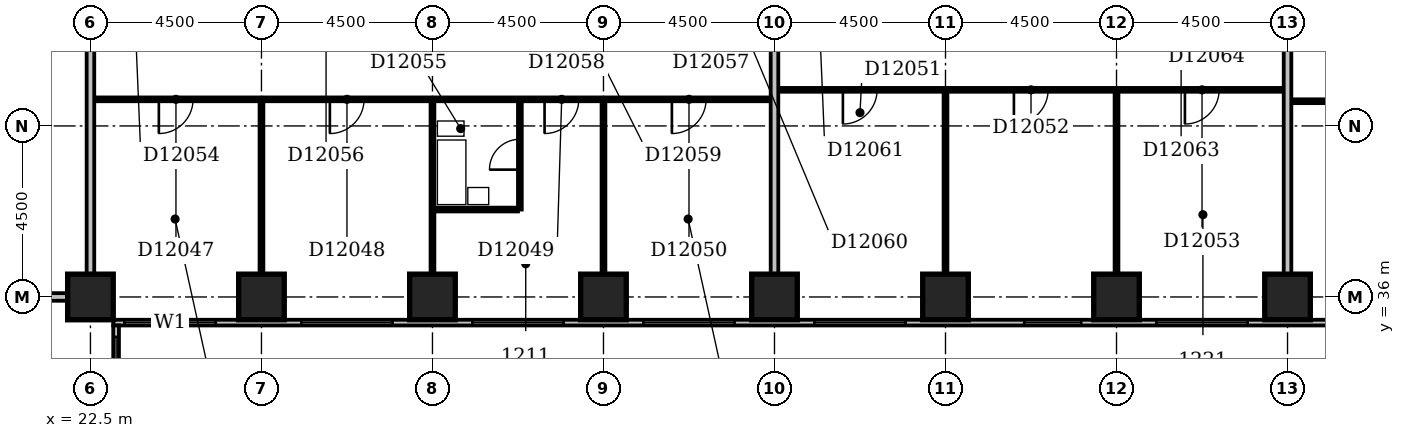
"""IFC4 building model, lengths in metres.
Left out: names, types, materials, properties, quantities, classifications, styles, units other than length and angle.
Written with IfcOpenShell. Run it as: python <this file> out.ifc"""

import sys

from ifc_helpers import new_model, si_unit, direction, frame, frame_2d, origin, origin_2d, place, context, subcontext, project, spatial, rectangle, extrude, element, fill, save


model = new_model("IFC4")
c1 = context("Model", 3, precision=1e-05, world=origin(), true_north=direction((0.0, 1.0)))
c2 = subcontext(c1, "Body", "Model", "MODEL_VIEW")
j1 = project(units=[si_unit("LENGTHUNIT", "METRE"), si_unit("PLANEANGLEUNIT", "RADIAN")], contexts=[c1])
p1 = place(None, origin())
s1 = spatial("IfcSite", under=j1, at=p1, CompositionType="ELEMENT")
p2 = place(p1, origin())
s2 = spatial("IfcBuilding", under=s1, at=p2, CompositionType="ELEMENT")
p3 = place(p2, frame((0.0, 0.0, 54.2)))
s3 = spatial("IfcBuildingStorey", under=s2, at=p3, CompositionType="ELEMENT", Elevation=54.2)
for number, where, z_axis, x_axis in (
    (1, (22.5, 36.0, -0.3), (0.0, 0.0, 1.0), (1.0, 0.0, 0.0)),
    (2, (27.0, 36.0, -0.3), (0.0, 0.0, 1.0), (1.0, 0.0, 0.0)),
    (3, (31.5, 36.0, -0.3), (0.0, 0.0, 1.0), (1.0, 0.0, 0.0)),
    (4, (36.0, 36.0, -0.3), (0.0, 0.0, 1.0), (1.0, 0.0, 0.0)),
    (5, (40.5, 36.0, -0.3), (0.0, 0.0, 1.0), (1.0, 0.0, 0.0)),
    (6, (45.0, 36.0, -0.3), (0.0, 0.0, 1.0), (1.0, 0.0, 0.0)),
    (7, (49.5, 36.0, -0.3), (0.0, 0.0, 1.0), (1.0, 0.0, 0.0)),
    (8, (54.0, 36.0, -0.3), (0.0, 0.0, 1.0), (1.0, 0.0, 0.0)),
):
    element("IfcColumn", number, at=place(p3, frame(where, z_axis=z_axis, x_axis=x_axis)), inside=s3, PredefinedType="COLUMN", context=c2, shape_type="SweptSolid", body=[
        extrude(rectangle(XDim=1.2, YDim=1.2, at=origin_2d()), origin(), (0.0, 0.0, 1.0), 3.6),
    ])
p4 = place(p3, frame((23.175, 17.4, 0.0), z_axis=(0.0, 0.0, 1.0), x_axis=(0.0, 1.0, 0.0)))
e9 = element("IfcWall", 9, at=p4, inside=s3, PredefinedType="STANDARD", context=c2, shape_type="SweptSolid", body=[
    extrude(rectangle(XDim=17.85, YDim=0.15, at=frame_2d((8.925, 0.0))), origin(), (0.0, 0.0, 1.0), 2.7),
])
p5 = place(p4, frame((1.444, 0.0, 0.6)))
e10 = element("IfcOpeningElement", 10, at=p5, cuts=e9, PredefinedType="OPENING", context=c2, shape_type="SweptSolid", body=[
    extrude(rectangle(XDim=2.4, YDim=1.8, at=frame_2d((1.2, 0.9))), frame((0.0, 0.087, 0.0), z_axis=(0.0, -1.0, 0.0), x_axis=(1.0, 0.0, 0.0)), (0.0, 0.0, 1.0), 0.174),
])
p6 = place(p4, frame((6.287, 0.0, 0.6)))
e11 = element("IfcOpeningElement", 11, at=p6, cuts=e9, PredefinedType="OPENING", context=c2, shape_type="SweptSolid", body=[
    extrude(rectangle(XDim=2.4, YDim=1.8, at=frame_2d((1.2, 0.9))), frame((0.0, 0.087, 0.0), z_axis=(0.0, -1.0, 0.0), x_axis=(1.0, 0.0, 0.0)), (0.0, 0.0, 1.0), 0.174),
])
p7 = place(p4, frame((10.65, 0.0, 0.6)))
e12 = element("IfcOpeningElement", 12, at=p7, cuts=e9, PredefinedType="OPENING", context=c2, shape_type="SweptSolid", body=[
    extrude(rectangle(XDim=2.4, YDim=1.8, at=frame_2d((1.2, 0.9))), frame((0.0, 0.087, 0.0), z_axis=(0.0, -1.0, 0.0), x_axis=(1.0, 0.0, 0.0)), (0.0, 0.0, 1.0), 0.174),
])
p8 = place(p4, frame((15.15, 0.0, 0.6)))
e13 = element("IfcOpeningElement", 13, at=p8, cuts=e9, PredefinedType="OPENING", context=c2, shape_type="SweptSolid", body=[
    extrude(rectangle(XDim=2.4, YDim=1.8, at=frame_2d((1.2, 0.9))), frame((0.0, 0.087, 0.0), z_axis=(0.0, -1.0, 0.0), x_axis=(1.0, 0.0, 0.0)), (0.0, 0.0, 1.0), 0.174),
])
p9 = place(p3, frame((23.1, 35.325, 0.0), z_axis=(0.0, 0.0, 1.0), x_axis=(1.0, 0.0, 0.0)))
e14 = element("IfcWall", 14, at=p9, inside=s3, PredefinedType="STANDARD", context=c2, shape_type="SweptSolid", body=[
    extrude(rectangle(XDim=45.15, YDim=0.15, at=frame_2d((22.575, 0.0))), origin(), (0.0, 0.0, 1.0), 2.7),
])
p10 = place(p9, frame((0.297, 0.0, 0.6)))
e15 = element("IfcOpeningElement", 15, at=p10, cuts=e14, PredefinedType="OPENING", context=c2, shape_type="SweptSolid", body=[
    extrude(rectangle(XDim=2.4, YDim=1.8, at=frame_2d((1.2, 0.9))), frame((0.0, 0.087, 0.0), z_axis=(0.0, -1.0, 0.0), x_axis=(1.0, 0.0, 0.0)), (0.0, 0.0, 1.0), 0.174),
])
p11 = place(p9, frame((4.95, 0.0, 0.6)))
e16 = element("IfcOpeningElement", 16, at=p11, cuts=e14, PredefinedType="OPENING", context=c2, shape_type="SweptSolid", body=[
    extrude(rectangle(XDim=2.4, YDim=1.8, at=frame_2d((1.2, 0.9))), frame((0.0, 0.087, 0.0), z_axis=(0.0, -1.0, 0.0), x_axis=(1.0, 0.0, 0.0)), (0.0, 0.0, 1.0), 0.174),
])
p12 = place(p9, frame((9.45, 0.0, 0.6)))
e17 = element("IfcOpeningElement", 17, at=p12, cuts=e14, PredefinedType="OPENING", context=c2, shape_type="SweptSolid", body=[
    extrude(rectangle(XDim=2.4, YDim=1.8, at=frame_2d((1.2, 0.9))), frame((0.0, 0.087, 0.0), z_axis=(0.0, -1.0, 0.0), x_axis=(1.0, 0.0, 0.0)), (0.0, 0.0, 1.0), 0.174),
])
p13 = place(p9, frame((13.95, 0.0, 0.6)))
e18 = element("IfcOpeningElement", 18, at=p13, cuts=e14, PredefinedType="OPENING", context=c2, shape_type="SweptSolid", body=[
    extrude(rectangle(XDim=2.4, YDim=1.8, at=frame_2d((1.2, 0.9))), frame((0.0, 0.087, 0.0), z_axis=(0.0, -1.0, 0.0), x_axis=(1.0, 0.0, 0.0)), (0.0, 0.0, 1.0), 0.174),
])
p14 = place(p9, frame((18.45, 0.0, 0.6)))
e19 = element("IfcOpeningElement", 19, at=p14, cuts=e14, PredefinedType="OPENING", context=c2, shape_type="SweptSolid", body=[
    extrude(rectangle(XDim=2.4, YDim=1.8, at=frame_2d((1.2, 0.9))), frame((0.0, 0.087, 0.0), z_axis=(0.0, -1.0, 0.0), x_axis=(1.0, 0.0, 0.0)), (0.0, 0.0, 1.0), 0.174),
])
p15 = place(p9, frame((23.97, 0.0, 0.6)))
e20 = element("IfcOpeningElement", 20, at=p15, cuts=e14, PredefinedType="OPENING", context=c2, shape_type="SweptSolid", body=[
    extrude(rectangle(XDim=1.5, YDim=1.8, at=frame_2d((0.75, 0.9))), frame((0.0, 0.087, 0.0), z_axis=(0.0, -1.0, 0.0), x_axis=(1.0, 0.0, 0.0)), (0.0, 0.0, 1.0), 0.174),
])
p16 = place(p9, frame((27.45, 0.0, 0.6)))
e21 = element("IfcOpeningElement", 21, at=p16, cuts=e14, PredefinedType="OPENING", context=c2, shape_type="SweptSolid", body=[
    extrude(rectangle(XDim=2.4, YDim=1.8, at=frame_2d((1.2, 0.9))), frame((0.0, 0.087, 0.0), z_axis=(0.0, -1.0, 0.0), x_axis=(1.0, 0.0, 0.0)), (0.0, 0.0, 1.0), 0.174),
])
p17 = place(p9, frame((32.403, 0.0, 0.6)))
e22 = element("IfcOpeningElement", 22, at=p17, cuts=e14, PredefinedType="OPENING", context=c2, shape_type="SweptSolid", body=[
    extrude(rectangle(XDim=2.1, YDim=1.8, at=frame_2d((1.05, 0.9))), frame((0.0, 0.087, 0.0), z_axis=(0.0, -1.0, 0.0), x_axis=(1.0, 0.0, 0.0)), (0.0, 0.0, 1.0), 0.174),
])
p18 = place(p9, frame((36.45, 0.0, 0.6)))
e23 = element("IfcOpeningElement", 23, at=p18, cuts=e14, PredefinedType="OPENING", context=c2, shape_type="SweptSolid", body=[
    extrude(rectangle(XDim=2.4, YDim=1.8, at=frame_2d((1.2, 0.9))), frame((0.0, 0.087, 0.0), z_axis=(0.0, -1.0, 0.0), x_axis=(1.0, 0.0, 0.0)), (0.0, 0.0, 1.0), 0.174),
])
p19 = place(p9, frame((40.95, 0.0, 0.6)))
e24 = element("IfcOpeningElement", 24, at=p19, cuts=e14, PredefinedType="OPENING", context=c2, shape_type="SweptSolid", body=[
    extrude(rectangle(XDim=2.4, YDim=1.8, at=frame_2d((1.2, 0.9))), frame((0.0, 0.087, 0.0), z_axis=(0.0, -1.0, 0.0), x_axis=(1.0, 0.0, 0.0)), (0.0, 0.0, 1.0), 0.174),
])
p20 = place(p3, frame((9.1, 36.0, 0.0), z_axis=(0.0, 0.0, 1.0), x_axis=(1.0, 0.0, 0.0)))
e25 = element("IfcWall", 25, at=p20, inside=s3, PredefinedType="PARTITIONING", context=c2, shape_type="SweptSolid", body=[
    extrude(rectangle(XDim=12.8, YDim=0.2, at=frame_2d((6.4, 0.0))), origin(), (0.0, 0.0, 1.0), 2.4),
])
p21 = place(p3, frame((22.5, 36.6, 0.0), z_axis=(0.0, 0.0, 1.0), x_axis=(0.0, 1.0, 0.0)))
e26 = element("IfcWall", 26, at=p21, inside=s3, PredefinedType="PARTITIONING", context=c2, shape_type="SweptSolid", body=[
    extrude(rectangle(XDim=12.8, YDim=0.2, at=frame_2d((6.4, 0.0))), origin(), (0.0, 0.0, 1.0), 3.3),
])
p22 = place(p3, frame((27.0, 36.6, 0.0), z_axis=(0.0, 0.0, 1.0), x_axis=(0.0, 1.0, 0.0)))
e27 = element("IfcWall", 27, at=p22, inside=s3, PredefinedType="PARTITIONING", context=c2, shape_type="SweptSolid", body=[
    extrude(rectangle(XDim=4.55, YDim=0.1, at=frame_2d((2.275, 0.0))), origin(), (0.0, 0.0, 1.0), 2.6),
])
p23 = place(p3, frame((31.5, 36.6, 0.0), z_axis=(0.0, 0.0, 1.0), x_axis=(0.0, 1.0, 0.0)))
e28 = element("IfcWall", 28, at=p23, inside=s3, PredefinedType="PARTITIONING", context=c2, shape_type="SweptSolid", body=[
    extrude(rectangle(XDim=4.55, YDim=0.1, at=frame_2d((2.275, 0.0))), origin(), (0.0, 0.0, 1.0), 3.3),
])
p24 = place(p3, frame((36.0, 36.6, 0.0), z_axis=(0.0, 0.0, 1.0), x_axis=(0.0, 1.0, 0.0)))
e29 = element("IfcWall", 29, at=p24, inside=s3, PredefinedType="PARTITIONING", context=c2, shape_type="SweptSolid", body=[
    extrude(rectangle(XDim=4.55, YDim=0.1, at=frame_2d((2.275, 0.0))), origin(), (0.0, 0.0, 1.0), 2.4),
])
p25 = place(p3, frame((40.5, 36.6, 0.0), z_axis=(0.0, 0.0, 1.0), x_axis=(0.0, 1.0, 0.0)))
e30 = element("IfcWall", 30, at=p25, inside=s3, PredefinedType="PARTITIONING", context=c2, shape_type="SweptSolid", body=[
    extrude(rectangle(XDim=12.8, YDim=0.2, at=frame_2d((6.4, 0.0))), origin(), (0.0, 0.0, 1.0), 3.3),
])
p26 = place(p3, frame((45.0, 36.6, 0.0), z_axis=(0.0, 0.0, 1.0), x_axis=(0.0, 1.0, 0.0)))
e31 = element("IfcWall", 31, at=p26, inside=s3, PredefinedType="PARTITIONING", context=c2, shape_type="SweptSolid", body=[
    extrude(rectangle(XDim=4.8, YDim=0.1, at=frame_2d((2.4, 0.0))), origin(), (0.0, 0.0, 1.0), 2.6),
])
p27 = place(p3, frame((49.5, 36.6, 0.0), z_axis=(0.0, 0.0, 1.0), x_axis=(0.0, 1.0, 0.0)))
e32 = element("IfcWall", 32, at=p27, inside=s3, PredefinedType="PARTITIONING", context=c2, shape_type="SweptSolid", body=[
    extrude(rectangle(XDim=4.8, YDim=0.1, at=frame_2d((2.4, 0.0))), origin(), (0.0, 0.0, 1.0), 3.3),
])
p28 = place(p3, frame((54.0, 36.6, 0.0), z_axis=(0.0, 0.0, 1.0), x_axis=(0.0, 1.0, 0.0)))
e33 = element("IfcWall", 33, at=p28, inside=s3, PredefinedType="PARTITIONING", context=c2, shape_type="SweptSolid", body=[
    extrude(rectangle(XDim=12.8, YDim=0.2, at=frame_2d((6.4, 0.0))), origin(), (0.0, 0.0, 1.0), 2.6),
])
p29 = place(p3, frame((31.55, 38.3, 0.0), z_axis=(0.0, 0.0, 1.0), x_axis=(1.0, 0.0, 0.0)))
e34 = element("IfcWall", 34, at=p29, inside=s3, PredefinedType="PLUMBINGWALL", context=c2, shape_type="SweptSolid", body=[
    extrude(rectangle(XDim=2.2, YDim=0.1, at=frame_2d((1.1, 0.0))), origin(), (0.0, 0.0, 1.0), 3.3),
])
p30 = place(p3, frame((33.8, 38.3, 0.0), z_axis=(0.0, 0.0, 1.0), x_axis=(0.0, 1.0, 0.0)))
e35 = element("IfcWall", 35, at=p30, inside=s3, PredefinedType="PLUMBINGWALL", context=c2, shape_type="SweptSolid", body=[
    extrude(rectangle(XDim=2.85, YDim=0.1, at=frame_2d((1.425, 0.0))), origin(), (0.0, 0.0, 1.0), 3.3),
])
p31 = place(p30, frame((1.05, 0.0, 0.0)))
e36 = element("IfcOpeningElement", 36, at=p31, cuts=e35, PredefinedType="OPENING", context=c2, shape_type="SweptSolid", body=[
    extrude(rectangle(XDim=0.8, YDim=2.1, at=frame_2d((0.4, 1.05))), frame((0.0, 0.062, 0.0), z_axis=(0.0, -1.0, 0.0), x_axis=(1.0, 0.0, 0.0)), (0.0, 0.0, 1.0), 0.124),
])
p32 = place(p3, frame((54.1, 41.15, 0.0), z_axis=(0.0, 0.0, 1.0), x_axis=(1.0, 0.0, 0.0)))
e37 = element("IfcWall", 37, at=p32, inside=s3, PredefinedType="PARTITIONING", context=c2, shape_type="SweptSolid", body=[
    extrude(rectangle(XDim=14.0, YDim=0.1, at=frame_2d((7.0, 0.0))), origin(), (0.0, 0.0, 1.0), 3.3),
])
p33 = place(p32, frame((1.7, 0.0, 0.0)))
e38 = element("IfcOpeningElement", 38, at=p33, cuts=e37, PredefinedType="OPENING", context=c2, shape_type="SweptSolid", body=[
    extrude(rectangle(XDim=0.9, YDim=2.1, at=frame_2d((0.45, 1.05))), frame((0.0, 0.062, 0.0), z_axis=(0.0, -1.0, 0.0), x_axis=(1.0, 0.0, 0.0)), (0.0, 0.0, 1.0), 0.124),
])
p34 = place(p32, frame((6.2, 0.0, 0.0)))
e39 = element("IfcOpeningElement", 39, at=p34, cuts=e37, PredefinedType="OPENING", context=c2, shape_type="SweptSolid", body=[
    extrude(rectangle(XDim=0.9, YDim=2.1, at=frame_2d((0.45, 1.05))), frame((0.0, 0.062, 0.0), z_axis=(0.0, -1.0, 0.0), x_axis=(1.0, 0.0, 0.0)), (0.0, 0.0, 1.0), 0.124),
])
p35 = place(p32, frame((10.7, 0.0, 0.0)))
e40 = element("IfcOpeningElement", 40, at=p35, cuts=e37, PredefinedType="OPENING", context=c2, shape_type="SweptSolid", body=[
    extrude(rectangle(XDim=0.9, YDim=2.1, at=frame_2d((0.45, 1.05))), frame((0.0, 0.062, 0.0), z_axis=(0.0, -1.0, 0.0), x_axis=(1.0, 0.0, 0.0)), (0.0, 0.0, 1.0), 0.124),
])
p36 = place(p3, frame((22.6, 41.2, 0.0), z_axis=(0.0, 0.0, 1.0), x_axis=(1.0, 0.0, 0.0)))
e41 = element("IfcWall", 41, at=p36, inside=s3, PredefinedType="PARTITIONING", context=c2, shape_type="SweptSolid", body=[
    extrude(rectangle(XDim=17.8, YDim=0.1, at=frame_2d((8.9, 0.0))), origin(), (0.0, 0.0, 1.0), 3.3),
])
p37 = place(p36, frame((1.7, 0.0, 0.0)))
e42 = element("IfcOpeningElement", 42, at=p37, cuts=e41, PredefinedType="OPENING", context=c2, shape_type="SweptSolid", body=[
    extrude(rectangle(XDim=0.9, YDim=2.1, at=frame_2d((0.45, 1.05))), frame((0.0, 0.062, 0.0), z_axis=(0.0, -1.0, 0.0), x_axis=(1.0, 0.0, 0.0)), (0.0, 0.0, 1.0), 0.124),
])
p38 = place(p36, frame((6.2, 0.0, 0.0)))
e43 = element("IfcOpeningElement", 43, at=p38, cuts=e41, PredefinedType="OPENING", context=c2, shape_type="SweptSolid", body=[
    extrude(rectangle(XDim=0.9, YDim=2.1, at=frame_2d((0.45, 1.05))), frame((0.0, 0.062, 0.0), z_axis=(0.0, -1.0, 0.0), x_axis=(1.0, 0.0, 0.0)), (0.0, 0.0, 1.0), 0.124),
])
p39 = place(p36, frame((11.85, 0.0, 0.0)))
e44 = element("IfcOpeningElement", 44, at=p39, cuts=e41, PredefinedType="OPENING", context=c2, shape_type="SweptSolid", body=[
    extrude(rectangle(XDim=0.9, YDim=2.1, at=frame_2d((0.45, 1.05))), frame((0.0, 0.062, 0.0), z_axis=(0.0, -1.0, 0.0), x_axis=(1.0, 0.0, 0.0)), (0.0, 0.0, 1.0), 0.124),
])
p40 = place(p36, frame((15.2, 0.0, 0.0)))
e45 = element("IfcOpeningElement", 45, at=p40, cuts=e41, PredefinedType="OPENING", context=c2, shape_type="SweptSolid", body=[
    extrude(rectangle(XDim=0.9, YDim=2.1, at=frame_2d((0.45, 1.05))), frame((0.0, 0.062, 0.0), z_axis=(0.0, -1.0, 0.0), x_axis=(1.0, 0.0, 0.0)), (0.0, 0.0, 1.0), 0.124),
])
p41 = place(p3, frame((40.6, 41.45, 0.0), z_axis=(0.0, 0.0, 1.0), x_axis=(1.0, 0.0, 0.0)))
e46 = element("IfcWall", 46, at=p41, inside=s3, PredefinedType="PARTITIONING", context=c2, shape_type="SweptSolid", body=[
    extrude(rectangle(XDim=13.3, YDim=0.1, at=frame_2d((6.65, 0.0))), origin(), (0.0, 0.0, 1.0), 3.3),
])
p42 = place(p41, frame((1.7, 0.0, 0.0)))
e47 = element("IfcOpeningElement", 47, at=p42, cuts=e46, PredefinedType="OPENING", context=c2, shape_type="SweptSolid", body=[
    extrude(rectangle(XDim=0.9, YDim=2.1, at=frame_2d((0.45, 1.05))), frame((0.0, 0.062, 0.0), z_axis=(0.0, -1.0, 0.0), x_axis=(1.0, 0.0, 0.0)), (0.0, 0.0, 1.0), 0.124),
])
p43 = place(p41, frame((6.2, 0.0, 0.0)))
e48 = element("IfcOpeningElement", 48, at=p43, cuts=e46, PredefinedType="OPENING", context=c2, shape_type="SweptSolid", body=[
    extrude(rectangle(XDim=0.9, YDim=2.1, at=frame_2d((0.45, 1.05))), frame((0.0, 0.062, 0.0), z_axis=(0.0, -1.0, 0.0), x_axis=(1.0, 0.0, 0.0)), (0.0, 0.0, 1.0), 0.124),
])
p44 = place(p41, frame((10.7, 0.0, 0.0)))
e49 = element("IfcOpeningElement", 49, at=p44, cuts=e46, PredefinedType="OPENING", context=c2, shape_type="SweptSolid", body=[
    extrude(rectangle(XDim=0.9, YDim=2.1, at=frame_2d((0.45, 1.05))), frame((0.0, 0.062, 0.0), z_axis=(0.0, -1.0, 0.0), x_axis=(1.0, 0.0, 0.0)), (0.0, 0.0, 1.0), 0.124),
])
p45 = place(p8, origin())
e50 = element("IfcWindow", 50, at=p45, inside=s3, PartitioningType="SINGLE_PANEL", PredefinedType="WINDOW", context=c2, shape_type="SweptSolid", body=[
    extrude(rectangle(XDim=2.4, YDim=1.8, at=frame_2d((1.2, 0.9))), frame((0.0, 0.03, 0.0), z_axis=(0.0, -1.0, 0.0), x_axis=(1.0, 0.0, 0.0)), (0.0, 0.0, 1.0), 0.06),
])
fill(e13, e50)
p46 = place(p10, origin())
e51 = element("IfcWindow", 51, at=p46, inside=s3, PartitioningType="SINGLE_PANEL", PredefinedType="WINDOW", context=c2, shape_type="SweptSolid", body=[
    extrude(rectangle(XDim=2.4, YDim=1.8, at=frame_2d((1.2, 0.9))), frame((0.0, 0.03, 0.0), z_axis=(0.0, -1.0, 0.0), x_axis=(1.0, 0.0, 0.0)), (0.0, 0.0, 1.0), 0.06),
])
fill(e15, e51)
p47 = place(p11, origin())
e52 = element("IfcWindow", 52, at=p47, inside=s3, PartitioningType="SINGLE_PANEL", PredefinedType="WINDOW", context=c2, shape_type="SweptSolid", body=[
    extrude(rectangle(XDim=2.4, YDim=1.8, at=frame_2d((1.2, 0.9))), frame((0.0, 0.03, 0.0), z_axis=(0.0, -1.0, 0.0), x_axis=(1.0, 0.0, 0.0)), (0.0, 0.0, 1.0), 0.06),
])
fill(e16, e52)
p48 = place(p12, origin())
e53 = element("IfcWindow", 53, at=p48, inside=s3, PartitioningType="SINGLE_PANEL", PredefinedType="WINDOW", context=c2, shape_type="SweptSolid", body=[
    extrude(rectangle(XDim=2.4, YDim=1.8, at=frame_2d((1.2, 0.9))), frame((0.0, 0.03, 0.0), z_axis=(0.0, -1.0, 0.0), x_axis=(1.0, 0.0, 0.0)), (0.0, 0.0, 1.0), 0.06),
])
fill(e17, e53)
p49 = place(p13, origin())
e54 = element("IfcWindow", 54, at=p49, inside=s3, PartitioningType="SINGLE_PANEL", PredefinedType="WINDOW", context=c2, shape_type="SweptSolid", body=[
    extrude(rectangle(XDim=2.4, YDim=1.8, at=frame_2d((1.2, 0.9))), frame((0.0, 0.03, 0.0), z_axis=(0.0, -1.0, 0.0), x_axis=(1.0, 0.0, 0.0)), (0.0, 0.0, 1.0), 0.06),
])
fill(e18, e54)
p50 = place(p14, origin())
e55 = element("IfcWindow", 55, at=p50, inside=s3, PartitioningType="SINGLE_PANEL", PredefinedType="WINDOW", context=c2, shape_type="SweptSolid", body=[
    extrude(rectangle(XDim=2.4, YDim=1.8, at=frame_2d((1.2, 0.9))), frame((0.0, 0.03, 0.0), z_axis=(0.0, -1.0, 0.0), x_axis=(1.0, 0.0, 0.0)), (0.0, 0.0, 1.0), 0.06),
])
fill(e19, e55)
p51 = place(p15, origin())
e56 = element("IfcWindow", 56, at=p51, inside=s3, PartitioningType="SINGLE_PANEL", PredefinedType="WINDOW", context=c2, shape_type="SweptSolid", body=[
    extrude(rectangle(XDim=1.5, YDim=1.8, at=frame_2d((0.75, 0.9))), frame((0.0, 0.03, 0.0), z_axis=(0.0, -1.0, 0.0), x_axis=(1.0, 0.0, 0.0)), (0.0, 0.0, 1.0), 0.06),
])
fill(e20, e56)
p52 = place(p16, origin())
e57 = element("IfcWindow", 57, at=p52, inside=s3, PartitioningType="SINGLE_PANEL", PredefinedType="WINDOW", context=c2, shape_type="SweptSolid", body=[
    extrude(rectangle(XDim=2.4, YDim=1.8, at=frame_2d((1.2, 0.9))), frame((0.0, 0.03, 0.0), z_axis=(0.0, -1.0, 0.0), x_axis=(1.0, 0.0, 0.0)), (0.0, 0.0, 1.0), 0.06),
])
fill(e21, e57)
p53 = place(p31, origin())
e58 = element("IfcDoor", 58, at=p53, inside=s3, OperationType="SINGLE_SWING_LEFT", PredefinedType="DOOR", context=c2, shape_type="SweptSolid", body=[
    extrude(rectangle(XDim=0.8, YDim=2.1, at=frame_2d((0.4, 1.05))), frame((0.0, 0.025, 0.0), z_axis=(0.0, -1.0, 0.0), x_axis=(1.0, 0.0, 0.0)), (0.0, 0.0, 1.0), 0.05),
])
fill(e36, e58)
p54 = place(p37, frame((0.9, 0.0, 0.0), z_axis=(0.0, 0.0, 1.0), x_axis=(-1.0, 0.0, 0.0)))
e59 = element("IfcDoor", 59, at=p54, inside=s3, OperationType="SINGLE_SWING_RIGHT", PredefinedType="DOOR", context=c2, shape_type="SweptSolid", body=[
    extrude(rectangle(XDim=0.9, YDim=2.1, at=frame_2d((0.45, 1.05))), frame((0.0, 0.025, 0.0), z_axis=(0.0, -1.0, 0.0), x_axis=(1.0, 0.0, 0.0)), (0.0, 0.0, 1.0), 0.05),
])
fill(e42, e59)
p55 = place(p38, frame((0.9, 0.0, 0.0), z_axis=(0.0, 0.0, 1.0), x_axis=(-1.0, 0.0, 0.0)))
e60 = element("IfcDoor", 60, at=p55, inside=s3, OperationType="SINGLE_SWING_RIGHT", PredefinedType="DOOR", context=c2, shape_type="SweptSolid", body=[
    extrude(rectangle(XDim=0.9, YDim=2.1, at=frame_2d((0.45, 1.05))), frame((0.0, 0.025, 0.0), z_axis=(0.0, -1.0, 0.0), x_axis=(1.0, 0.0, 0.0)), (0.0, 0.0, 1.0), 0.05),
])
fill(e43, e60)
p56 = place(p39, frame((0.9, 0.0, 0.0), z_axis=(0.0, 0.0, 1.0), x_axis=(-1.0, 0.0, 0.0)))
e61 = element("IfcDoor", 61, at=p56, inside=s3, OperationType="SINGLE_SWING_RIGHT", PredefinedType="DOOR", context=c2, shape_type="SweptSolid", body=[
    extrude(rectangle(XDim=0.9, YDim=2.1, at=frame_2d((0.45, 1.05))), frame((0.0, 0.025, 0.0), z_axis=(0.0, -1.0, 0.0), x_axis=(1.0, 0.0, 0.0)), (0.0, 0.0, 1.0), 0.05),
])
fill(e44, e61)
p57 = place(p40, frame((0.9, 0.0, 0.0), z_axis=(0.0, 0.0, 1.0), x_axis=(-1.0, 0.0, 0.0)))
e62 = element("IfcDoor", 62, at=p57, inside=s3, OperationType="SINGLE_SWING_RIGHT", PredefinedType="DOOR", context=c2, shape_type="SweptSolid", body=[
    extrude(rectangle(XDim=0.9, YDim=2.1, at=frame_2d((0.45, 1.05))), frame((0.0, 0.025, 0.0), z_axis=(0.0, -1.0, 0.0), x_axis=(1.0, 0.0, 0.0)), (0.0, 0.0, 1.0), 0.05),
])
fill(e45, e62)
p58 = place(p42, frame((0.9, 0.0, 0.0), z_axis=(0.0, 0.0, 1.0), x_axis=(-1.0, 0.0, 0.0)))
e63 = element("IfcDoor", 63, at=p58, inside=s3, OperationType="SINGLE_SWING_RIGHT", PredefinedType="DOOR", context=c2, shape_type="SweptSolid", body=[
    extrude(rectangle(XDim=0.9, YDim=2.1, at=frame_2d((0.45, 1.05))), frame((0.0, 0.025, 0.0), z_axis=(0.0, -1.0, 0.0), x_axis=(1.0, 0.0, 0.0)), (0.0, 0.0, 1.0), 0.05),
])
fill(e47, e63)
p59 = place(p43, frame((0.9, 0.0, 0.0), z_axis=(0.0, 0.0, 1.0), x_axis=(-1.0, 0.0, 0.0)))
e64 = element("IfcDoor", 64, at=p59, inside=s3, OperationType="SINGLE_SWING_RIGHT", PredefinedType="DOOR", context=c2, shape_type="SweptSolid", body=[
    extrude(rectangle(XDim=0.9, YDim=2.1, at=frame_2d((0.45, 1.05))), frame((0.0, 0.025, 0.0), z_axis=(0.0, -1.0, 0.0), x_axis=(1.0, 0.0, 0.0)), (0.0, 0.0, 1.0), 0.05),
])
fill(e48, e64)
p60 = place(p44, frame((0.9, 0.0, 0.0), z_axis=(0.0, 0.0, 1.0), x_axis=(-1.0, 0.0, 0.0)))
e65 = element("IfcDoor", 65, at=p60, inside=s3, OperationType="SINGLE_SWING_RIGHT", PredefinedType="DOOR", context=c2, shape_type="SweptSolid", body=[
    extrude(rectangle(XDim=0.9, YDim=2.1, at=frame_2d((0.45, 1.05))), frame((0.0, 0.025, 0.0), z_axis=(0.0, -1.0, 0.0), x_axis=(1.0, 0.0, 0.0)), (0.0, 0.0, 1.0), 0.05),
])
fill(e49, e65)
save(model, sys.argv[1])
